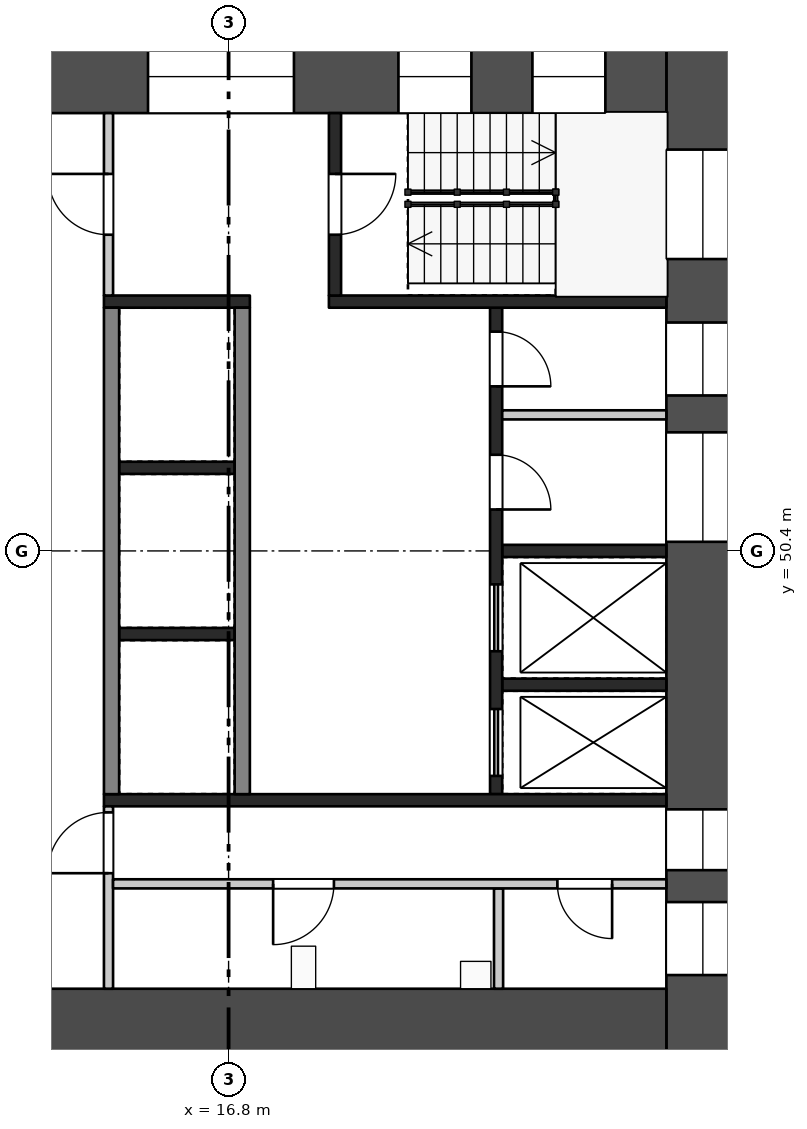
"""IFC4 building model, lengths in metres.
Left out: names, types, materials, properties, quantities, classifications, styles, units other than length and angle.
Written with IfcOpenShell. Run it as: python <this file> out.ifc"""

import sys

from ifc_helpers import new_model, si_unit, direction, frame, frame_2d, origin, place, context, subcontext, project, spatial, rectangle, extrude, element, fill, save


model = new_model("IFC4")
c1 = context("Model", 3, precision=1e-05, world=origin(), true_north=direction((0.0, 1.0)))
c2 = subcontext(c1, "Body", "Model", "MODEL_VIEW")
j1 = project(units=[si_unit("LENGTHUNIT", "METRE"), si_unit("PLANEANGLEUNIT", "RADIAN")], contexts=[c1])
p1 = place(None, origin())
s1 = spatial("IfcSite", under=j1, at=p1, CompositionType="ELEMENT")
p2 = place(p1, origin())
s2 = spatial("IfcBuilding", under=s1, at=p2, CompositionType="ELEMENT")
p3 = place(p2, frame((0.0, 0.0, 133.7)))
s3 = spatial("IfcBuildingStorey", under=s2, at=p3, CompositionType="ELEMENT", Elevation=133.7)
p4 = place(p3, frame((24.6, 58.8, 0.0), z_axis=(0.0, 0.0, 1.0), x_axis=(0.0, -1.0, 0.0)))
e1 = element("IfcWall", 1, at=p4, inside=s3, PredefinedType="SHEAR", context=c2, shape_type="SweptSolid", body=[
    extrude(rectangle(XDim=16.8, YDim=1.2, at=frame_2d((8.4, 0.0))), origin(), (0.0, 0.0, 1.0), 3.22),
])
p5 = place(p4, frame((1.8, 0.0, 0.5)))
e2 = element("IfcOpeningElement", 2, at=p5, cuts=e1, PredefinedType="OPENING", context=c2, shape_type="SweptSolid", body=[
    extrude(rectangle(XDim=1.8, YDim=2.4, at=frame_2d((0.9, 1.2))), frame((0.0, 0.61, 0.0), z_axis=(0.0, -1.0, 0.0), x_axis=(1.0, 0.0, 0.0)), (0.0, 0.0, 1.0), 1.22),
])
p6 = place(p4, frame((4.644, 0.0, 1.6)))
e3 = element("IfcOpeningElement", 3, at=p6, cuts=e1, PredefinedType="OPENING", context=c2, shape_type="SweptSolid", body=[
    extrude(rectangle(XDim=1.2, YDim=1.2, at=frame_2d((0.6, 0.6))), frame((0.0, 0.61, 0.0), z_axis=(0.0, -1.0, 0.0), x_axis=(1.0, 0.0, 0.0)), (0.0, 0.0, 1.0), 1.22),
])
p7 = place(p4, frame((6.45, 0.0, 1.6)))
e4 = element("IfcOpeningElement", 4, at=p7, cuts=e1, PredefinedType="OPENING", context=c2, shape_type="SweptSolid", body=[
    extrude(rectangle(XDim=1.8, YDim=1.2, at=frame_2d((0.9, 0.6))), frame((0.0, 0.61, 0.0), z_axis=(0.0, -1.0, 0.0), x_axis=(1.0, 0.0, 0.0)), (0.0, 0.0, 1.0), 1.22),
])
p8 = place(p4, frame((12.65, 0.0, 0.6)))
e5 = element("IfcOpeningElement", 5, at=p8, cuts=e1, PredefinedType="OPENING", context=c2, shape_type="SweptSolid", body=[
    extrude(rectangle(XDim=1.0, YDim=2.1, at=frame_2d((0.5, 1.05))), frame((0.0, 0.61, 0.0), z_axis=(0.0, -1.0, 0.0), x_axis=(1.0, 0.0, 0.0)), (0.0, 0.0, 1.0), 1.22),
])
p9 = place(p4, frame((14.175, 0.0, 1.6)))
e6 = element("IfcOpeningElement", 6, at=p9, cuts=e1, PredefinedType="OPENING", context=c2, shape_type="SweptSolid", body=[
    extrude(rectangle(XDim=1.2, YDim=1.2, at=frame_2d((0.6, 0.6))), frame((0.0, 0.61, 0.0), z_axis=(0.0, -1.0, 0.0), x_axis=(1.0, 0.0, 0.0)), (0.0, 0.0, 1.0), 1.22),
])
p10 = place(p3, frame((9.6, 58.2, 0.0), z_axis=(0.0, 0.0, 1.0), x_axis=(1.0, 0.0, 0.0)))
e7 = element("IfcWall", 7, at=p10, inside=s3, PredefinedType="SHEAR", context=c2, shape_type="SweptSolid", body=[
    extrude(rectangle(XDim=14.4, YDim=1.2, at=frame_2d((7.2, 0.0))), origin(), (0.0, 0.0, 1.0), 3.22),
])
p11 = place(p10, frame((1.105, 0.0, 0.6)))
e8 = element("IfcOpeningElement", 8, at=p11, cuts=e7, PredefinedType="OPENING", context=c2, shape_type="SweptSolid", body=[
    extrude(rectangle(XDim=3.0, YDim=2.1, at=frame_2d((1.5, 1.05))), frame((0.0, 0.61, 0.0), z_axis=(0.0, -1.0, 0.0), x_axis=(1.0, 0.0, 0.0)), (0.0, 0.0, 1.0), 1.22),
])
p12 = place(p10, frame((5.875, 0.0, 0.6)))
e9 = element("IfcOpeningElement", 9, at=p12, cuts=e7, PredefinedType="OPENING", context=c2, shape_type="SweptSolid", body=[
    extrude(rectangle(XDim=2.4, YDim=2.1, at=frame_2d((1.2, 1.05))), frame((0.0, 0.61, 0.0), z_axis=(0.0, -1.0, 0.0), x_axis=(1.0, 0.0, 0.0)), (0.0, 0.0, 1.0), 1.22),
])
p13 = place(p10, frame((9.993, 0.0, 0.5)))
e10 = element("IfcOpeningElement", 10, at=p13, cuts=e7, PredefinedType="OPENING", context=c2, shape_type="SweptSolid", body=[
    extrude(rectangle(XDim=1.2, YDim=2.4, at=frame_2d((0.6, 1.2))), frame((0.0, 0.61, 0.0), z_axis=(0.0, -1.0, 0.0), x_axis=(1.0, 0.0, 0.0)), (0.0, 0.0, 1.0), 1.22),
])
p14 = place(p10, frame((12.197, 0.0, 0.5)))
e11 = element("IfcOpeningElement", 11, at=p14, cuts=e7, PredefinedType="OPENING", context=c2, shape_type="SweptSolid", body=[
    extrude(rectangle(XDim=1.2, YDim=2.4, at=frame_2d((0.6, 1.2))), frame((0.0, 0.61, 0.0), z_axis=(0.0, -1.0, 0.0), x_axis=(1.0, 0.0, 0.0)), (0.0, 0.0, 1.0), 1.22),
])
p15 = place(p3, frame((9.6, 42.6, 0.0), z_axis=(0.0, 0.0, 1.0), x_axis=(1.0, 0.0, 0.0)))
e12 = element("IfcWall", 12, at=p15, inside=s3, PredefinedType="SHEAR", context=c2, shape_type="SweptSolid", body=[
    extrude(rectangle(XDim=14.4, YDim=1.2, at=frame_2d((7.2, 0.0))), origin(), (0.0, 0.0, 1.0), 3.22),
])
p16 = place(p15, frame((2.1, 0.0, 0.0)))
e13 = element("IfcOpeningElement", 13, at=p16, cuts=e12, PredefinedType="OPENING", context=c2, shape_type="SweptSolid", body=[
    extrude(rectangle(XDim=1.8, YDim=2.1, at=frame_2d((0.9, 1.05))), frame((0.0, 0.61, 0.0), z_axis=(0.0, -1.0, 0.0), x_axis=(1.0, 0.0, 0.0)), (0.0, 0.0, 1.0), 1.22),
])
for number, where, z_axis, x_axis in (
    (14, (15.0, 51.767, 0.0), (0.0, 0.0, 1.0), (1.0, 0.0, 0.0)),
    (15, (15.0, 49.033, 0.0), (0.0, 0.0, 1.0), (1.0, 0.0, 0.0)),
):
    element("IfcWall", number, at=place(p3, frame(where, z_axis=z_axis, x_axis=x_axis)), inside=s3, PredefinedType="SHEAR", context=c2, shape_type="SweptSolid", body=[
        extrude(rectangle(XDim=1.9, YDim=0.2, at=frame_2d((0.95, 0.0))), origin(), (0.0, 0.0, 1.0), 3.22),
    ])
for number, where, z_axis, x_axis in (
    (16, (14.875, 54.4, 0.0), (0.0, 0.0, 1.0), (0.0, -1.0, 0.0)),
    (17, (17.025, 54.4, 0.0), (0.0, 0.0, 1.0), (0.0, -1.0, 0.0)),
):
    element("IfcWall", number, at=place(p3, frame(where, z_axis=z_axis, x_axis=x_axis)), inside=s3, PredefinedType="SHEAR", context=c2, shape_type="SweptSolid", body=[
        extrude(rectangle(XDim=8.0, YDim=0.25, at=frame_2d((4.0, 0.0))), origin(), (0.0, 0.0, 1.0), 3.22),
    ])
for number, where, z_axis, x_axis in (
    (18, (21.3, 50.4, 0.0), (0.0, 0.0, 1.0), (1.0, 0.0, 0.0)),
    (19, (21.3, 48.2, 0.0), (0.0, 0.0, 1.0), (1.0, 0.0, 0.0)),
):
    element("IfcWall", number, at=place(p3, frame(where, z_axis=z_axis, x_axis=x_axis)), inside=s3, PredefinedType="SHEAR", context=c2, shape_type="SweptSolid", body=[
        extrude(rectangle(XDim=2.7, YDim=0.2, at=frame_2d((1.35, 0.0))), origin(), (0.0, 0.0, 1.0), 3.22),
    ])
p17 = place(p3, frame((21.3, 52.637, 0.0), z_axis=(0.0, 0.0, 1.0), x_axis=(1.0, 0.0, 0.0)))
e20 = element("IfcWall", 20, at=p17, inside=s3, PredefinedType="PARTITIONING", context=c2, shape_type="SweptSolid", body=[
    extrude(rectangle(XDim=2.7, YDim=0.15, at=frame_2d((1.35, 0.0))), origin(), (0.0, 0.0, 1.0), 3.22),
])
p18 = place(p3, frame((21.2, 54.4, 0.0), z_axis=(0.0, 0.0, 1.0), x_axis=(0.0, -1.0, 0.0)))
e21 = element("IfcWall", 21, at=p18, inside=s3, PredefinedType="SHEAR", context=c2, shape_type="SweptSolid", body=[
    extrude(rectangle(XDim=8.0, YDim=0.2, at=frame_2d((4.0, 0.0))), origin(), (0.0, 0.0, 1.0), 3.22),
])
p19 = place(p18, frame((0.394, 0.0, 0.0)))
e22 = element("IfcOpeningElement", 22, at=p19, cuts=e21, PredefinedType="OPENING", context=c2, shape_type="SweptSolid", body=[
    extrude(rectangle(XDim=0.9, YDim=2.1, at=frame_2d((0.45, 1.05))), frame((0.0, 0.11, 0.0), z_axis=(0.0, -1.0, 0.0), x_axis=(1.0, 0.0, 0.0)), (0.0, 0.0, 1.0), 0.22),
])
p20 = place(p18, frame((2.419, 0.0, 0.0)))
e23 = element("IfcOpeningElement", 23, at=p20, cuts=e21, PredefinedType="OPENING", context=c2, shape_type="SweptSolid", body=[
    extrude(rectangle(XDim=0.9, YDim=2.1, at=frame_2d((0.45, 1.05))), frame((0.0, 0.11, 0.0), z_axis=(0.0, -1.0, 0.0), x_axis=(1.0, 0.0, 0.0)), (0.0, 0.0, 1.0), 0.22),
])
p21 = place(p18, frame((4.55, 0.0, 0.0)))
e24 = element("IfcOpeningElement", 24, at=p21, cuts=e21, PredefinedType="OPENING", context=c2, shape_type="SweptSolid", body=[
    extrude(rectangle(XDim=1.1, YDim=2.1, at=frame_2d((0.55, 1.05))), frame((0.0, 0.11, 0.0), z_axis=(0.0, -1.0, 0.0), x_axis=(1.0, 0.0, 0.0)), (0.0, 0.0, 1.0), 0.22),
])
p22 = place(p18, frame((6.6, 0.0, 0.0)))
e25 = element("IfcOpeningElement", 25, at=p22, cuts=e21, PredefinedType="OPENING", context=c2, shape_type="SweptSolid", body=[
    extrude(rectangle(XDim=1.1, YDim=2.1, at=frame_2d((0.55, 1.05))), frame((0.0, 0.11, 0.0), z_axis=(0.0, -1.0, 0.0), x_axis=(1.0, 0.0, 0.0)), (0.0, 0.0, 1.0), 0.22),
])
p23 = place(p3, frame((14.75, 54.5, 0.0), z_axis=(0.0, 0.0, 1.0), x_axis=(1.0, 0.0, 0.0)))
e26 = element("IfcWall", 26, at=p23, inside=s3, PredefinedType="SHEAR", context=c2, shape_type="SweptSolid", body=[
    extrude(rectangle(XDim=2.4, YDim=0.2, at=frame_2d((1.2, 0.0))), origin(), (0.0, 0.0, 1.0), 3.22),
])
p24 = place(p3, frame((18.45, 54.5, 0.0), z_axis=(0.0, 0.0, 1.0), x_axis=(1.0, 0.0, 0.0)))
e27 = element("IfcWall", 27, at=p24, inside=s3, PredefinedType="SHEAR", context=c2, shape_type="SweptSolid", body=[
    extrude(rectangle(XDim=5.55, YDim=0.2, at=frame_2d((2.775, 0.0))), origin(), (0.0, 0.0, 1.0), 3.22),
])
p25 = place(p3, frame((14.825, 57.6, 0.0), z_axis=(0.0, 0.0, 1.0), x_axis=(0.0, -1.0, 0.0)))
e28 = element("IfcWall", 28, at=p25, inside=s3, PredefinedType="PARTITIONING", context=c2, shape_type="SweptSolid", body=[
    extrude(rectangle(XDim=3.0, YDim=0.15, at=frame_2d((1.5, 0.0))), origin(), (0.0, 0.0, 1.0), 3.22),
])
p26 = place(p25, frame((1.0, 0.0, 0.0)))
e29 = element("IfcOpeningElement", 29, at=p26, cuts=e28, PredefinedType="OPENING", context=c2, shape_type="SweptSolid", body=[
    extrude(rectangle(XDim=1.0, YDim=2.1, at=frame_2d((0.5, 1.05))), frame((0.0, 0.085, 0.0), z_axis=(0.0, -1.0, 0.0), x_axis=(1.0, 0.0, 0.0)), (0.0, 0.0, 1.0), 0.17),
])
p27 = place(p3, frame((18.55, 57.6, 0.0), z_axis=(0.0, 0.0, 1.0), x_axis=(0.0, -1.0, 0.0)))
e30 = element("IfcWall", 30, at=p27, inside=s3, PredefinedType="SHEAR", context=c2, shape_type="SweptSolid", body=[
    extrude(rectangle(XDim=3.0, YDim=0.2, at=frame_2d((1.5, 0.0))), origin(), (0.0, 0.0, 1.0), 3.22),
])
p28 = place(p27, frame((1.0, 0.0, 0.0)))
e31 = element("IfcOpeningElement", 31, at=p28, cuts=e30, PredefinedType="OPENING", context=c2, shape_type="SweptSolid", body=[
    extrude(rectangle(XDim=1.0, YDim=2.1, at=frame_2d((0.5, 1.05))), frame((0.0, 0.11, 0.0), z_axis=(0.0, -1.0, 0.0), x_axis=(1.0, 0.0, 0.0)), (0.0, 0.0, 1.0), 0.22),
])
p29 = place(p3, frame((14.75, 46.3, 0.0), z_axis=(0.0, 0.0, 1.0), x_axis=(1.0, 0.0, 0.0)))
e32 = element("IfcWall", 32, at=p29, inside=s3, PredefinedType="SHEAR", context=c2, shape_type="SweptSolid", body=[
    extrude(rectangle(XDim=9.25, YDim=0.2, at=frame_2d((4.625, 0.0))), origin(), (0.0, 0.0, 1.0), 3.22),
])
p30 = place(p3, frame((14.825, 46.2, 0.0), z_axis=(0.0, 0.0, 1.0), x_axis=(0.0, -1.0, 0.0)))
e33 = element("IfcWall", 33, at=p30, inside=s3, PredefinedType="PARTITIONING", context=c2, shape_type="SweptSolid", body=[
    extrude(rectangle(XDim=3.0, YDim=0.15, at=frame_2d((1.5, 0.0))), origin(), (0.0, 0.0, 1.0), 3.22),
])
p31 = place(p30, frame((0.1, 0.0, 0.0)))
e34 = element("IfcOpeningElement", 34, at=p31, cuts=e33, PredefinedType="OPENING", context=c2, shape_type="SweptSolid", body=[
    extrude(rectangle(XDim=1.0, YDim=2.1, at=frame_2d((0.5, 1.05))), frame((0.0, 0.085, 0.0), z_axis=(0.0, -1.0, 0.0), x_axis=(1.0, 0.0, 0.0)), (0.0, 0.0, 1.0), 0.17),
])
p32 = place(p3, frame((21.24, 44.85, 0.0), z_axis=(0.0, 0.0, 1.0), x_axis=(0.0, -1.0, 0.0)))
e35 = element("IfcWall", 35, at=p32, inside=s3, PredefinedType="PARTITIONING", context=c2, shape_type="SweptSolid", body=[
    extrude(rectangle(XDim=1.65, YDim=0.15, at=frame_2d((0.825, 0.0))), origin(), (0.0, 0.0, 1.0), 3.22),
])
p33 = place(p3, frame((14.9, 44.925, 0.0), z_axis=(0.0, 0.0, 1.0), x_axis=(1.0, 0.0, 0.0)))
e36 = element("IfcWall", 36, at=p33, inside=s3, PredefinedType="PARTITIONING", context=c2, shape_type="SweptSolid", body=[
    extrude(rectangle(XDim=9.1, YDim=0.15, at=frame_2d((4.55, 0.0))), origin(), (0.0, 0.0, 1.0), 3.22),
])
p34 = place(p33, frame((2.633, 0.0, 0.0)))
e37 = element("IfcOpeningElement", 37, at=p34, cuts=e36, PredefinedType="OPENING", context=c2, shape_type="SweptSolid", body=[
    extrude(rectangle(XDim=1.0, YDim=2.1, at=frame_2d((0.5, 1.05))), frame((0.0, 0.085, 0.0), z_axis=(0.0, -1.0, 0.0), x_axis=(1.0, 0.0, 0.0)), (0.0, 0.0, 1.0), 0.17),
])
p35 = place(p33, frame((7.308, 0.0, 0.0)))
e38 = element("IfcOpeningElement", 38, at=p35, cuts=e36, PredefinedType="OPENING", context=c2, shape_type="SweptSolid", body=[
    extrude(rectangle(XDim=0.9, YDim=2.1, at=frame_2d((0.45, 1.05))), frame((0.0, 0.085, 0.0), z_axis=(0.0, -1.0, 0.0), x_axis=(1.0, 0.0, 0.0)), (0.0, 0.0, 1.0), 0.17),
])
p36 = place(p19, origin())
e39 = element("IfcDoor", 39, at=p36, inside=s3, OperationType="SINGLE_SWING_RIGHT", PredefinedType="DOOR", context=c2, shape_type="SweptSolid", body=[
    extrude(rectangle(XDim=0.9, YDim=2.1, at=frame_2d((0.45, 1.05))), frame((0.0, 0.025, 0.0), z_axis=(0.0, -1.0, 0.0), x_axis=(1.0, 0.0, 0.0)), (0.0, 0.0, 1.0), 0.05),
])
fill(e22, e39)
p37 = place(p20, origin())
e40 = element("IfcDoor", 40, at=p37, inside=s3, OperationType="SINGLE_SWING_RIGHT", PredefinedType="DOOR", context=c2, shape_type="SweptSolid", body=[
    extrude(rectangle(XDim=0.9, YDim=2.1, at=frame_2d((0.45, 1.05))), frame((0.0, 0.025, 0.0), z_axis=(0.0, -1.0, 0.0), x_axis=(1.0, 0.0, 0.0)), (0.0, 0.0, 1.0), 0.05),
])
fill(e23, e40)
p38 = place(p21, origin())
e41 = element("IfcDoor", 41, at=p38, inside=s3, OperationType="DOUBLE_DOOR_SLIDING", PredefinedType="DOOR", context=c2, shape_type="SweptSolid", body=[
    extrude(rectangle(XDim=1.1, YDim=2.1, at=frame_2d((0.55, 1.05))), frame((0.0, 0.025, 0.0), z_axis=(0.0, -1.0, 0.0), x_axis=(1.0, 0.0, 0.0)), (0.0, 0.0, 1.0), 0.05),
])
fill(e24, e41)
p39 = place(p22, origin())
e42 = element("IfcDoor", 42, at=p39, inside=s3, OperationType="DOUBLE_DOOR_SLIDING", PredefinedType="DOOR", context=c2, shape_type="SweptSolid", body=[
    extrude(rectangle(XDim=1.1, YDim=2.1, at=frame_2d((0.55, 1.05))), frame((0.0, 0.025, 0.0), z_axis=(0.0, -1.0, 0.0), x_axis=(1.0, 0.0, 0.0)), (0.0, 0.0, 1.0), 0.05),
])
fill(e25, e42)
p40 = place(p26, frame((1.0, 0.0, 0.0), z_axis=(0.0, 0.0, 1.0), x_axis=(-1.0, 0.0, 0.0)))
e43 = element("IfcDoor", 43, at=p40, inside=s3, OperationType="SINGLE_SWING_RIGHT", PredefinedType="DOOR", context=c2, shape_type="SweptSolid", body=[
    extrude(rectangle(XDim=1.0, YDim=2.1, at=frame_2d((0.5, 1.05))), frame((0.0, 0.025, 0.0), z_axis=(0.0, -1.0, 0.0), x_axis=(1.0, 0.0, 0.0)), (0.0, 0.0, 1.0), 0.05),
])
fill(e29, e43)
p41 = place(p28, origin())
e44 = element("IfcDoor", 44, at=p41, inside=s3, OperationType="SINGLE_SWING_LEFT", PredefinedType="DOOR", context=c2, shape_type="SweptSolid", body=[
    extrude(rectangle(XDim=1.0, YDim=2.1, at=frame_2d((0.5, 1.05))), frame((0.0, 0.025, 0.0), z_axis=(0.0, -1.0, 0.0), x_axis=(1.0, 0.0, 0.0)), (0.0, 0.0, 1.0), 0.05),
])
fill(e31, e44)
p42 = place(p31, frame((1.0, 0.0, 0.0), z_axis=(0.0, 0.0, 1.0), x_axis=(-1.0, 0.0, 0.0)))
e45 = element("IfcDoor", 45, at=p42, inside=s3, OperationType="SINGLE_SWING_LEFT", PredefinedType="DOOR", context=c2, shape_type="SweptSolid", body=[
    extrude(rectangle(XDim=1.0, YDim=2.1, at=frame_2d((0.5, 1.05))), frame((0.0, 0.025, 0.0), z_axis=(0.0, -1.0, 0.0), x_axis=(1.0, 0.0, 0.0)), (0.0, 0.0, 1.0), 0.05),
])
fill(e34, e45)
p43 = place(p34, frame((1.0, 0.0, 0.0), z_axis=(0.0, 0.0, 1.0), x_axis=(-1.0, 0.0, 0.0)))
e46 = element("IfcDoor", 46, at=p43, inside=s3, OperationType="SINGLE_SWING_RIGHT", PredefinedType="DOOR", context=c2, shape_type="SweptSolid", body=[
    extrude(rectangle(XDim=1.0, YDim=2.1, at=frame_2d((0.5, 1.05))), frame((0.0, 0.025, 0.0), z_axis=(0.0, -1.0, 0.0), x_axis=(1.0, 0.0, 0.0)), (0.0, 0.0, 1.0), 0.05),
])
fill(e37, e46)
p44 = place(p35, frame((0.9, 0.0, 0.0), z_axis=(0.0, 0.0, 1.0), x_axis=(-1.0, 0.0, 0.0)))
e47 = element("IfcDoor", 47, at=p44, inside=s3, OperationType="SINGLE_SWING_LEFT", PredefinedType="DOOR", context=c2, shape_type="SweptSolid", body=[
    extrude(rectangle(XDim=0.9, YDim=2.1, at=frame_2d((0.45, 1.05))), frame((0.0, 0.025, 0.0), z_axis=(0.0, -1.0, 0.0), x_axis=(1.0, 0.0, 0.0)), (0.0, 0.0, 1.0), 0.05),
])
fill(e38, e47)
p45 = place(p5, origin())
e48 = element("IfcWindow", 48, at=p45, inside=s3, PartitioningType="SINGLE_PANEL", PredefinedType="WINDOW", context=c2, shape_type="SweptSolid", body=[
    extrude(rectangle(XDim=1.8, YDim=2.4, at=frame_2d((0.9, 1.2))), frame((0.0, 0.03, 0.0), z_axis=(0.0, -1.0, 0.0), x_axis=(1.0, 0.0, 0.0)), (0.0, 0.0, 1.0), 0.06),
])
fill(e2, e48)
p46 = place(p6, origin())
e49 = element("IfcWindow", 49, at=p46, inside=s3, PartitioningType="SINGLE_PANEL", PredefinedType="WINDOW", context=c2, shape_type="SweptSolid", body=[
    extrude(rectangle(XDim=1.2, YDim=1.2, at=frame_2d((0.6, 0.6))), frame((0.0, 0.03, 0.0), z_axis=(0.0, -1.0, 0.0), x_axis=(1.0, 0.0, 0.0)), (0.0, 0.0, 1.0), 0.06),
])
fill(e3, e49)
p47 = place(p7, origin())
e50 = element("IfcWindow", 50, at=p47, inside=s3, PartitioningType="SINGLE_PANEL", PredefinedType="WINDOW", context=c2, shape_type="SweptSolid", body=[
    extrude(rectangle(XDim=1.8, YDim=1.2, at=frame_2d((0.9, 0.6))), frame((0.0, 0.03, 0.0), z_axis=(0.0, -1.0, 0.0), x_axis=(1.0, 0.0, 0.0)), (0.0, 0.0, 1.0), 0.06),
])
fill(e4, e50)
p48 = place(p8, origin())
e51 = element("IfcWindow", 51, at=p48, inside=s3, PartitioningType="SINGLE_PANEL", PredefinedType="WINDOW", context=c2, shape_type="SweptSolid", body=[
    extrude(rectangle(XDim=1.0, YDim=2.1, at=frame_2d((0.5, 1.05))), frame((0.0, 0.03, 0.0), z_axis=(0.0, -1.0, 0.0), x_axis=(1.0, 0.0, 0.0)), (0.0, 0.0, 1.0), 0.06),
])
fill(e5, e51)
p49 = place(p9, origin())
e52 = element("IfcWindow", 52, at=p49, inside=s3, PartitioningType="SINGLE_PANEL", PredefinedType="WINDOW", context=c2, shape_type="SweptSolid", body=[
    extrude(rectangle(XDim=1.2, YDim=1.2, at=frame_2d((0.6, 0.6))), frame((0.0, 0.03, 0.0), z_axis=(0.0, -1.0, 0.0), x_axis=(1.0, 0.0, 0.0)), (0.0, 0.0, 1.0), 0.06),
])
fill(e6, e52)
p50 = place(p12, origin())
e53 = element("IfcWindow", 53, at=p50, inside=s3, PartitioningType="SINGLE_PANEL", PredefinedType="WINDOW", context=c2, shape_type="SweptSolid", body=[
    extrude(rectangle(XDim=2.4, YDim=2.1, at=frame_2d((1.2, 1.05))), frame((0.0, 0.03, 0.0), z_axis=(0.0, -1.0, 0.0), x_axis=(1.0, 0.0, 0.0)), (0.0, 0.0, 1.0), 0.06),
])
fill(e9, e53)
p51 = place(p13, origin())
e54 = element("IfcWindow", 54, at=p51, inside=s3, PartitioningType="SINGLE_PANEL", PredefinedType="WINDOW", context=c2, shape_type="SweptSolid", body=[
    extrude(rectangle(XDim=1.2, YDim=2.4, at=frame_2d((0.6, 1.2))), frame((0.0, 0.03, 0.0), z_axis=(0.0, -1.0, 0.0), x_axis=(1.0, 0.0, 0.0)), (0.0, 0.0, 1.0), 0.06),
])
fill(e10, e54)
p52 = place(p14, origin())
e55 = element("IfcWindow", 55, at=p52, inside=s3, PartitioningType="SINGLE_PANEL", PredefinedType="WINDOW", context=c2, shape_type="SweptSolid", body=[
    extrude(rectangle(XDim=1.2, YDim=2.4, at=frame_2d((0.6, 1.2))), frame((0.0, 0.03, 0.0), z_axis=(0.0, -1.0, 0.0), x_axis=(1.0, 0.0, 0.0)), (0.0, 0.0, 1.0), 0.06),
])
fill(e11, e55)
save(model, sys.argv[1])
